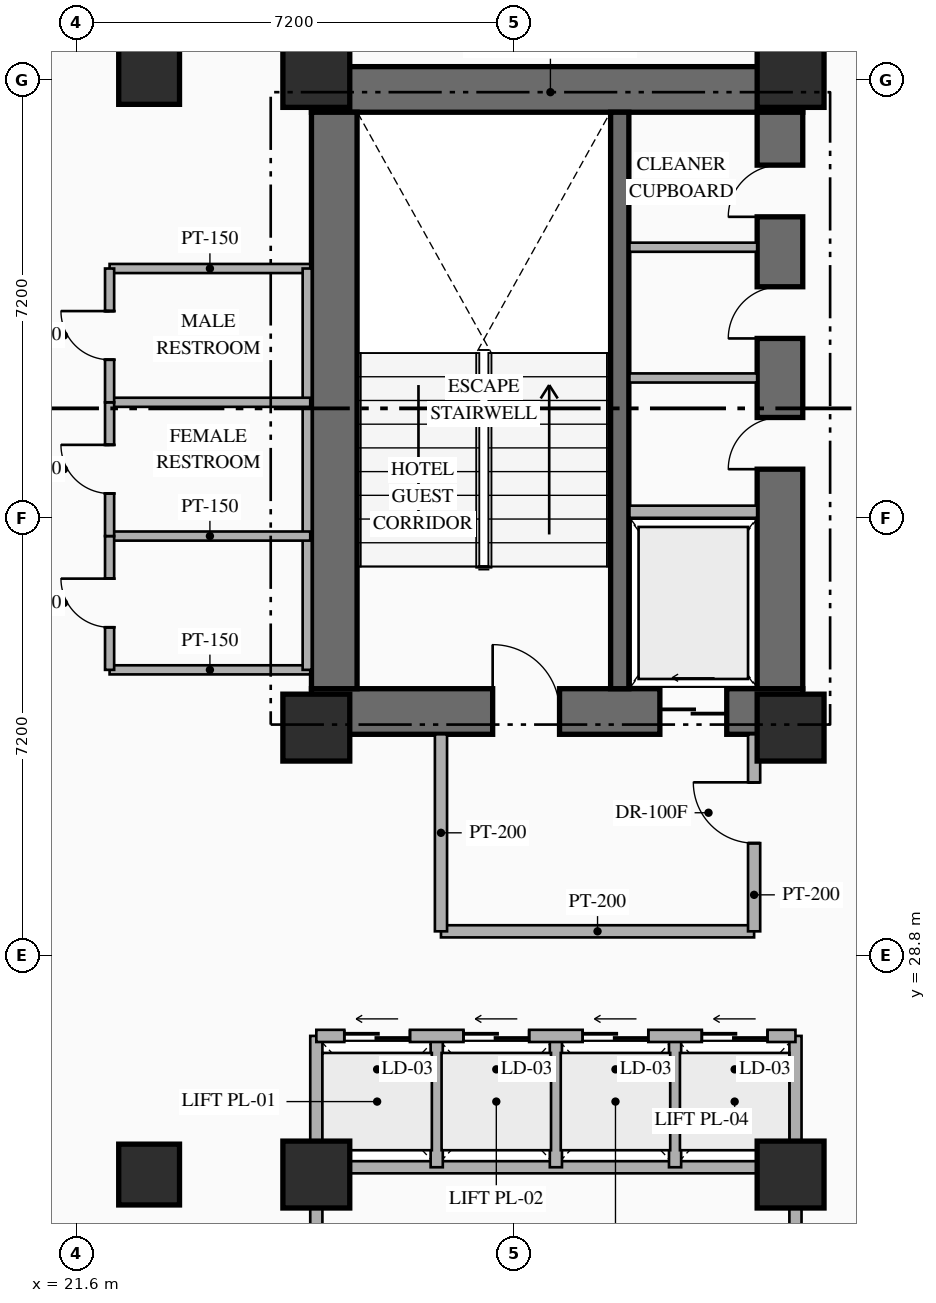
"""IFC4 building model, lengths in metres.
Left out: names, types, materials, properties, quantities, classifications, styles, units other than length and angle.
Written with IfcOpenShell. Run it as: python <this file> out.ifc"""

import sys

from ifc_helpers import new_model, si_unit, direction, frame, frame_2d, origin, origin_2d, place, context, subcontext, project, spatial, rectangle, hollow_rectangle, extrude, element, fill, save


model = new_model("IFC4")
c1 = context("Model", 3, precision=1e-05, world=origin(), true_north=direction((0.0, 1.0)))
c2 = subcontext(c1, "Body", "Model", "MODEL_VIEW")
j1 = project(units=[si_unit("LENGTHUNIT", "METRE"), si_unit("PLANEANGLEUNIT", "RADIAN")], contexts=[c1])
p1 = place(None, origin())
s1 = spatial("IfcSite", under=j1, at=p1, CompositionType="ELEMENT")
p2 = place(p1, origin())
s2 = spatial("IfcBuilding", under=s1, at=p2, CompositionType="ELEMENT")
p3 = place(p2, frame((0.0, 0.0, 50.0)))
s3 = spatial("IfcBuildingStorey", under=s2, at=p3, CompositionType="ELEMENT", Elevation=50.0)
p4 = place(p3, frame((25.47, 32.815, 0.0), z_axis=(0.0, 0.0, 1.0), x_axis=(1.0, 0.0, 0.0)))
e1 = element("IfcWall", 1, at=p4, inside=s3, PredefinedType="SHEAR", context=c2, shape_type="SweptSolid", body=[
    extrude(rectangle(XDim=8.08, YDim=0.75, at=frame_2d((4.04, 0.0))), origin(), (0.0, 0.0, 1.0), 3.35),
])
p5 = place(p4, frame((2.98, 0.0, 0.0)))
e2 = element("IfcOpeningElement", 2, at=p5, cuts=e1, PredefinedType="OPENING", context=c2, shape_type="SweptSolid", body=[
    extrude(rectangle(XDim=1.1, YDim=2.2, at=frame_2d((0.55, 1.1))), frame((0.0, 0.385, 0.0), z_axis=(0.0, -1.0, 0.0), x_axis=(1.0, 0.0, 0.0)), (0.0, 0.0, 1.0), 0.77),
])
p6 = place(p4, frame((5.73, 0.0, 0.0)))
e3 = element("IfcOpeningElement", 3, at=p6, cuts=e1, PredefinedType="OPENING", context=c2, shape_type="SweptSolid", body=[
    extrude(rectangle(XDim=1.1, YDim=2.15, at=frame_2d((0.55, 1.075))), frame((0.0, 0.385, 0.0), z_axis=(0.0, -1.0, 0.0), x_axis=(1.0, 0.0, 0.0)), (0.0, 0.0, 1.0), 0.77),
])
p7 = place(p3, frame((25.47, 43.045, 0.0), z_axis=(0.0, 0.0, 1.0), x_axis=(1.0, 0.0, 0.0)))
e4 = element("IfcWall", 4, at=p7, inside=s3, PredefinedType="SHEAR", context=c2, shape_type="SweptSolid", body=[
    extrude(rectangle(XDim=8.08, YDim=0.75, at=frame_2d((4.04, 0.0))), origin(), (0.0, 0.0, 1.0), 3.35),
])
p8 = place(p3, frame((25.845, 33.19, 0.0), z_axis=(0.0, 0.0, 1.0), x_axis=(0.0, 1.0, 0.0)))
e5 = element("IfcWall", 5, at=p8, inside=s3, PredefinedType="SHEAR", context=c2, shape_type="SweptSolid", body=[
    extrude(rectangle(XDim=9.48, YDim=0.75, at=frame_2d((4.74, 0.0))), origin(), (0.0, 0.0, 1.0), 3.35),
])
p9 = place(p3, frame((33.175, 33.19, 0.0), z_axis=(0.0, 0.0, 1.0), x_axis=(0.0, 1.0, 0.0)))
e6 = element("IfcWall", 6, at=p9, inside=s3, PredefinedType="SHEAR", context=c2, shape_type="SweptSolid", body=[
    extrude(rectangle(XDim=9.48, YDim=0.75, at=frame_2d((4.74, 0.0))), origin(), (0.0, 0.0, 1.0), 3.35),
])
p10 = place(p9, frame((3.61, 0.0, 0.0)))
e7 = element("IfcOpeningElement", 7, at=p10, cuts=e6, PredefinedType="OPENING", context=c2, shape_type="SweptSolid", body=[
    extrude(rectangle(XDim=0.85, YDim=2.08, at=frame_2d((0.425, 1.04))), frame((0.0, 0.385, 0.0), z_axis=(0.0, -1.0, 0.0), x_axis=(1.0, 0.0, 0.0)), (0.0, 0.0, 1.0), 0.77),
])
p11 = place(p9, frame((5.76, 0.0, 0.0)))
e8 = element("IfcOpeningElement", 8, at=p11, cuts=e6, PredefinedType="OPENING", context=c2, shape_type="SweptSolid", body=[
    extrude(rectangle(XDim=0.85, YDim=2.08, at=frame_2d((0.425, 1.04))), frame((0.0, 0.385, 0.0), z_axis=(0.0, -1.0, 0.0), x_axis=(1.0, 0.0, 0.0)), (0.0, 0.0, 1.0), 0.77),
])
p12 = place(p9, frame((7.76, 0.0, 0.0)))
e9 = element("IfcOpeningElement", 9, at=p12, cuts=e6, PredefinedType="OPENING", context=c2, shape_type="SweptSolid", body=[
    extrude(rectangle(XDim=0.85, YDim=2.08, at=frame_2d((0.425, 1.04))), frame((0.0, 0.385, 0.0), z_axis=(0.0, -1.0, 0.0), x_axis=(1.0, 0.0, 0.0)), (0.0, 0.0, 1.0), 0.77),
])
p13 = place(p3, frame((30.54, 33.19, 0.0), z_axis=(0.0, 0.0, 1.0), x_axis=(0.0, 1.0, 0.0)))
e10 = element("IfcWall", 10, at=p13, inside=s3, PredefinedType="SHEAR", context=c2, shape_type="SweptSolid", body=[
    extrude(rectangle(XDim=9.48, YDim=0.3, at=frame_2d((4.74, 0.0))), origin(), (0.0, 0.0, 1.0), 3.35),
])
for number, where, z_axis, x_axis in (
    (11, (25.55, 32.55, 0.0), (0.0, 0.0, 1.0), (1.0, 0.0, 0.0)),
    (12, (33.35, 32.55, 0.0), (0.0, 0.0, 1.0), (1.0, 0.0, 0.0)),
    (13, (25.55, 43.3, 0.0), (0.0, 0.0, 1.0), (1.0, 0.0, 0.0)),
    (14, (33.35, 43.3, 0.0), (0.0, 0.0, 1.0), (1.0, 0.0, 0.0)),
):
    element("IfcColumn", number, at=place(p3, frame(where, z_axis=z_axis, x_axis=x_axis)), inside=s3, PredefinedType="COLUMN", context=c2, shape_type="SweptSolid", body=[
        extrude(rectangle(XDim=1.1, YDim=1.1, at=origin_2d()), origin(), (0.0, 0.0, 1.0), 3.35),
    ])
for number, where, z_axis, x_axis in (
    (15, (25.55, 25.2, 0.0), (0.0, 0.0, 1.0), (1.0, 0.0, 0.0)),
    (16, (33.35, 25.2, 0.0), (0.0, 0.0, 1.0), (1.0, 0.0, 0.0)),
):
    element("IfcColumn", number, at=place(p3, frame(where, z_axis=z_axis, x_axis=x_axis)), inside=s3, PredefinedType="COLUMN", context=c2, shape_type="SweptSolid", body=[
        extrude(hollow_rectangle(XDim=1.1, YDim=1.1, WallThickness=0.04, at=origin_2d()), origin(), (0.0, 0.0, 1.0), 3.35),
    ])
for number, where, z_axis, x_axis in (
    (17, (22.8, 25.2, 0.0), (0.0, 0.0, 1.0), (1.0, 0.0, 0.0)),
    (18, (22.8, 43.3, 0.0), (0.0, 0.0, 1.0), (1.0, 0.0, 0.0)),
):
    element("IfcColumn", number, at=place(p3, frame(where, z_axis=z_axis, x_axis=x_axis)), inside=s3, PredefinedType="COLUMN", context=c2, shape_type="SweptSolid", body=[
        extrude(hollow_rectangle(XDim=1.0, YDim=1.0, WallThickness=0.038, at=origin_2d()), origin(), (0.0, 0.0, 1.0), 3.35),
    ])
p14 = place(p3, frame((30.7, 36.1, 0.0), z_axis=(0.0, 0.0, 1.0), x_axis=(1.0, 0.0, 0.0)))
e19 = element("IfcWall", 19, at=p14, inside=s3, PredefinedType="STANDARD", context=c2, shape_type="SweptSolid", body=[
    extrude(rectangle(XDim=2.1, YDim=0.2, at=frame_2d((1.05, 0.0))), origin(), (0.0, 0.0, 1.0), 3.13),
])
for number, where, z_axis, x_axis in (
    (20, (30.7, 38.3, 0.0), (0.0, 0.0, 1.0), (1.0, 0.0, 0.0)),
    (21, (30.7, 40.45, 0.0), (0.0, 0.0, 1.0), (1.0, 0.0, 0.0)),
):
    element("IfcWall", number, at=place(p3, frame(where, z_axis=z_axis, x_axis=x_axis)), inside=s3, PredefinedType="PARTITIONING", context=c2, shape_type="SweptSolid", body=[
        extrude(rectangle(XDim=2.1, YDim=0.15, at=frame_2d((1.05, 0.0))), origin(), (0.0, 0.0, 1.0), 3.13),
    ])
p15 = place(p3, frame((27.6, 29.2, 0.0), z_axis=(0.0, 0.0, 1.0), x_axis=(1.0, 0.0, 0.0)))
e22 = element("IfcWall", 22, at=p15, inside=s3, PredefinedType="STANDARD", context=c2, shape_type="SweptSolid", body=[
    extrude(rectangle(XDim=5.15, YDim=0.2, at=frame_2d((2.575, 0.0))), origin(), (0.0, 0.0, 1.0), 3.13),
])
p16 = place(p3, frame((27.6, 29.2, 0.0), z_axis=(0.0, 0.0, 1.0), x_axis=(0.0, 1.0, 0.0)))
e23 = element("IfcWall", 23, at=p16, inside=s3, PredefinedType="STANDARD", context=c2, shape_type="SweptSolid", body=[
    extrude(rectangle(XDim=3.24, YDim=0.2, at=frame_2d((1.62, 0.0))), origin(), (0.0, 0.0, 1.0), 3.13),
])
p17 = place(p3, frame((32.75, 29.2, 0.0), z_axis=(0.0, 0.0, 1.0), x_axis=(0.0, 1.0, 0.0)))
e24 = element("IfcWall", 24, at=p17, inside=s3, PredefinedType="STANDARD", context=c2, shape_type="SweptSolid", body=[
    extrude(rectangle(XDim=3.24, YDim=0.2, at=frame_2d((1.62, 0.0))), origin(), (0.0, 0.0, 1.0), 3.13),
])
p18 = place(p17, frame((1.45, 0.0, 0.0)))
e25 = element("IfcOpeningElement", 25, at=p18, cuts=e24, PredefinedType="OPENING", context=c2, shape_type="SweptSolid", body=[
    extrude(rectangle(XDim=1.0, YDim=2.2, at=frame_2d((0.5, 1.1))), frame((0.0, 0.11, 0.0), z_axis=(0.0, -1.0, 0.0), x_axis=(1.0, 0.0, 0.0)), (0.0, 0.0, 1.0), 0.22),
])
for number, where, z_axis, x_axis in (
    (26, (25.55, 23.4, 0.0), (0.0, 0.0, 1.0), (0.0, 1.0, 0.0)),
    (27, (33.43, 23.4, 0.0), (0.0, 0.0, 1.0), (0.0, 1.0, 0.0)),
):
    element("IfcWall", number, at=place(p3, frame(where, z_axis=z_axis, x_axis=x_axis)), inside=s3, PredefinedType="STANDARD", context=c2, shape_type="SweptSolid", body=[
        extrude(rectangle(XDim=4.08, YDim=0.2, at=frame_2d((2.04, 0.0))), origin(), (0.0, 0.0, 1.0), 2.425),
    ])
p19 = place(p3, frame((25.55, 25.32, 0.0), z_axis=(0.0, 0.0, 1.0), x_axis=(1.0, 0.0, 0.0)))
e28 = element("IfcWall", 28, at=p19, inside=s3, PredefinedType="STANDARD", context=c2, shape_type="SweptSolid", body=[
    extrude(rectangle(XDim=7.88, YDim=0.2, at=frame_2d((3.94, 0.0))), origin(), (0.0, 0.0, 1.0), 2.525),
])
for number, where, z_axis, x_axis in (
    (29, (27.53, 25.32, 0.0), (0.0, 0.0, 1.0), (0.0, 1.0, 0.0)),
    (30, (29.49, 25.32, 0.0), (0.0, 0.0, 1.0), (0.0, 1.0, 0.0)),
    (31, (31.45, 25.32, 0.0), (0.0, 0.0, 1.0), (0.0, 1.0, 0.0)),
):
    element("IfcWall", number, at=place(p3, frame(where, z_axis=z_axis, x_axis=x_axis)), inside=s3, PredefinedType="STANDARD", context=c2, shape_type="SweptSolid", body=[
        extrude(rectangle(XDim=2.16, YDim=0.2, at=frame_2d((1.08, 0.0))), origin(), (0.0, 0.0, 1.0), 3.13),
    ])
p20 = place(p3, frame((25.55, 27.48, 0.0), z_axis=(0.0, 0.0, 1.0), x_axis=(1.0, 0.0, 0.0)))
e32 = element("IfcWall", 32, at=p20, inside=s3, PredefinedType="STANDARD", context=c2, shape_type="SweptSolid", body=[
    extrude(rectangle(XDim=7.88, YDim=0.2, at=frame_2d((3.94, 0.0))), origin(), (0.0, 0.0, 1.0), 3.13),
])
p21 = place(p20, frame((0.46, 0.0, 0.0)))
e33 = element("IfcOpeningElement", 33, at=p21, cuts=e32, PredefinedType="OPENING", context=c2, shape_type="SweptSolid", body=[
    extrude(rectangle(XDim=1.08, YDim=2.15, at=frame_2d((0.54, 1.075))), frame((0.0, 0.11, 0.0), z_axis=(0.0, -1.0, 0.0), x_axis=(1.0, 0.0, 0.0)), (0.0, 0.0, 1.0), 0.22),
])
p22 = place(p20, frame((2.42, 0.0, 0.0)))
e34 = element("IfcOpeningElement", 34, at=p22, cuts=e32, PredefinedType="OPENING", context=c2, shape_type="SweptSolid", body=[
    extrude(rectangle(XDim=1.08, YDim=2.15, at=frame_2d((0.54, 1.075))), frame((0.0, 0.11, 0.0), z_axis=(0.0, -1.0, 0.0), x_axis=(1.0, 0.0, 0.0)), (0.0, 0.0, 1.0), 0.22),
])
p23 = place(p20, frame((4.38, 0.0, 0.0)))
e35 = element("IfcOpeningElement", 35, at=p23, cuts=e32, PredefinedType="OPENING", context=c2, shape_type="SweptSolid", body=[
    extrude(rectangle(XDim=1.08, YDim=2.15, at=frame_2d((0.54, 1.075))), frame((0.0, 0.11, 0.0), z_axis=(0.0, -1.0, 0.0), x_axis=(1.0, 0.0, 0.0)), (0.0, 0.0, 1.0), 0.22),
])
p24 = place(p20, frame((6.34, 0.0, 0.0)))
e36 = element("IfcOpeningElement", 36, at=p24, cuts=e32, PredefinedType="OPENING", context=c2, shape_type="SweptSolid", body=[
    extrude(rectangle(XDim=1.08, YDim=2.15, at=frame_2d((0.54, 1.075))), frame((0.0, 0.11, 0.0), z_axis=(0.0, -1.0, 0.0), x_axis=(1.0, 0.0, 0.0)), (0.0, 0.0, 1.0), 0.22),
])
for number, where, z_axis, x_axis in (
    (37, (22.15, 33.5, 0.0), (0.0, 0.0, 1.0), (1.0, 0.0, 0.0)),
    (38, (22.15, 40.1, 0.0), (0.0, 0.0, 1.0), (1.0, 0.0, 0.0)),
):
    element("IfcWall", number, at=place(p3, frame(where, z_axis=z_axis, x_axis=x_axis)), inside=s3, PredefinedType="PARTITIONING", context=c2, shape_type="SweptSolid", body=[
        extrude(rectangle(XDim=3.3, YDim=0.15, at=frame_2d((1.65, 0.0))), origin(), (0.0, 0.0, 1.0), 3.13),
    ])
p25 = place(p3, frame((25.4, 33.5, 0.0), z_axis=(0.0, 0.0, 1.0), x_axis=(0.0, 1.0, 0.0)))
e39 = element("IfcWall", 39, at=p25, inside=s3, PredefinedType="PARTITIONING", context=c2, shape_type="SweptSolid", body=[
    extrude(rectangle(XDim=6.6, YDim=0.15, at=frame_2d((3.3, 0.0))), origin(), (0.0, 0.0, 1.0), 3.13),
])
for number, where, z_axis, x_axis in (
    (40, (22.15, 35.7, 0.0), (0.0, 0.0, 1.0), (1.0, 0.0, 0.0)),
    (41, (22.15, 37.9, 0.0), (0.0, 0.0, 1.0), (1.0, 0.0, 0.0)),
):
    element("IfcWall", number, at=place(p3, frame(where, z_axis=z_axis, x_axis=x_axis)), inside=s3, PredefinedType="PARTITIONING", context=c2, shape_type="SweptSolid", body=[
        extrude(rectangle(XDim=3.3, YDim=0.15, at=frame_2d((1.65, 0.0))), origin(), (0.0, 0.0, 1.0), 3.13),
    ])
p26 = place(p3, frame((22.15, 33.5, 0.0), z_axis=(0.0, 0.0, 1.0), x_axis=(0.0, 1.0, 0.0)))
e42 = element("IfcWall", 42, at=p26, inside=s3, PredefinedType="PARTITIONING", context=c2, shape_type="SweptSolid", body=[
    extrude(rectangle(XDim=2.2, YDim=0.15, at=frame_2d((1.1, 0.0))), origin(), (0.0, 0.0, 1.0), 3.13),
])
p27 = place(p26, frame((0.7, 0.0, 0.0)))
e43 = element("IfcOpeningElement", 43, at=p27, cuts=e42, PredefinedType="OPENING", context=c2, shape_type="SweptSolid", body=[
    extrude(rectangle(XDim=0.8, YDim=2.06, at=frame_2d((0.4, 1.03))), frame((0.0, 0.085, 0.0), z_axis=(0.0, -1.0, 0.0), x_axis=(1.0, 0.0, 0.0)), (0.0, 0.0, 1.0), 0.17),
])
p28 = place(p3, frame((22.15, 35.7, 0.0), z_axis=(0.0, 0.0, 1.0), x_axis=(0.0, 1.0, 0.0)))
e44 = element("IfcWall", 44, at=p28, inside=s3, PredefinedType="PARTITIONING", context=c2, shape_type="SweptSolid", body=[
    extrude(rectangle(XDim=2.2, YDim=0.15, at=frame_2d((1.1, 0.0))), origin(), (0.0, 0.0, 1.0), 3.13),
])
p29 = place(p28, frame((0.7, 0.0, 0.0)))
e45 = element("IfcOpeningElement", 45, at=p29, cuts=e44, PredefinedType="OPENING", context=c2, shape_type="SweptSolid", body=[
    extrude(rectangle(XDim=0.8, YDim=2.06, at=frame_2d((0.4, 1.03))), frame((0.0, 0.085, 0.0), z_axis=(0.0, -1.0, 0.0), x_axis=(1.0, 0.0, 0.0)), (0.0, 0.0, 1.0), 0.17),
])
p30 = place(p3, frame((22.15, 37.9, 0.0), z_axis=(0.0, 0.0, 1.0), x_axis=(0.0, 1.0, 0.0)))
e46 = element("IfcWall", 46, at=p30, inside=s3, PredefinedType="PARTITIONING", context=c2, shape_type="SweptSolid", body=[
    extrude(rectangle(XDim=2.2, YDim=0.15, at=frame_2d((1.1, 0.0))), origin(), (0.0, 0.0, 1.0), 3.13),
])
p31 = place(p30, frame((0.7, 0.0, 0.0)))
e47 = element("IfcOpeningElement", 47, at=p31, cuts=e46, PredefinedType="OPENING", context=c2, shape_type="SweptSolid", body=[
    extrude(rectangle(XDim=0.8, YDim=2.06, at=frame_2d((0.4, 1.03))), frame((0.0, 0.085, 0.0), z_axis=(0.0, -1.0, 0.0), x_axis=(1.0, 0.0, 0.0)), (0.0, 0.0, 1.0), 0.17),
])
p32 = place(p3, frame((33.384, 17.312, 0.0), z_axis=(0.0, 0.0, 1.0), x_axis=(0.600008743659, 0.799993442181, 0.0)))
e48 = element("IfcWall", 48, at=p32, inside=s3, PredefinedType="PARTITIONING", context=c2, shape_type="SweptSolid", body=[
    extrude(rectangle(XDim=8.935, YDim=0.15, at=frame_2d((4.468, 0.0))), origin(), (0.0, 0.0, 1.0), 3.13),
])
p33 = place(p5, origin())
e49 = element("IfcDoor", 49, at=p33, inside=s3, OperationType="SINGLE_SWING_LEFT", PredefinedType="DOOR", context=c2, shape_type="SweptSolid", body=[
    extrude(rectangle(XDim=1.1, YDim=2.2, at=frame_2d((0.55, 1.1))), frame((0.0, 0.025, 0.0), z_axis=(0.0, -1.0, 0.0), x_axis=(1.0, 0.0, 0.0)), (0.0, 0.0, 1.0), 0.05),
])
fill(e2, e49)
p34 = place(p6, origin())
e50 = element("IfcDoor", 50, at=p34, inside=s3, OperationType="SLIDING_TO_LEFT", PredefinedType="USERDEFINED", context=c2, shape_type="SweptSolid", body=[
    extrude(rectangle(XDim=1.1, YDim=2.15, at=frame_2d((0.55, 1.075))), frame((0.0, 0.025, 0.0), z_axis=(0.0, -1.0, 0.0), x_axis=(1.0, 0.0, 0.0)), (0.0, 0.0, 1.0), 0.05),
])
fill(e3, e50)
p35 = place(p10, origin())
e51 = element("IfcDoor", 51, at=p35, inside=s3, OperationType="SINGLE_SWING_LEFT", PredefinedType="DOOR", context=c2, shape_type="SweptSolid", body=[
    extrude(rectangle(XDim=0.85, YDim=2.08, at=frame_2d((0.425, 1.04))), frame((0.0, 0.025, 0.0), z_axis=(0.0, -1.0, 0.0), x_axis=(1.0, 0.0, 0.0)), (0.0, 0.0, 1.0), 0.05),
])
fill(e7, e51)
p36 = place(p11, origin())
e52 = element("IfcDoor", 52, at=p36, inside=s3, OperationType="SINGLE_SWING_LEFT", PredefinedType="DOOR", context=c2, shape_type="SweptSolid", body=[
    extrude(rectangle(XDim=0.85, YDim=2.08, at=frame_2d((0.425, 1.04))), frame((0.0, 0.025, 0.0), z_axis=(0.0, -1.0, 0.0), x_axis=(1.0, 0.0, 0.0)), (0.0, 0.0, 1.0), 0.05),
])
fill(e8, e52)
p37 = place(p12, origin())
e53 = element("IfcDoor", 53, at=p37, inside=s3, OperationType="SINGLE_SWING_LEFT", PredefinedType="DOOR", context=c2, shape_type="SweptSolid", body=[
    extrude(rectangle(XDim=0.85, YDim=2.08, at=frame_2d((0.425, 1.04))), frame((0.0, 0.025, 0.0), z_axis=(0.0, -1.0, 0.0), x_axis=(1.0, 0.0, 0.0)), (0.0, 0.0, 1.0), 0.05),
])
fill(e9, e53)
p38 = place(p18, origin())
e54 = element("IfcDoor", 54, at=p38, inside=s3, OperationType="SINGLE_SWING_RIGHT", PredefinedType="DOOR", context=c2, shape_type="SweptSolid", body=[
    extrude(rectangle(XDim=1.0, YDim=2.2, at=frame_2d((0.5, 1.1))), frame((0.0, 0.025, 0.0), z_axis=(0.0, -1.0, 0.0), x_axis=(1.0, 0.0, 0.0)), (0.0, 0.0, 1.0), 0.05),
])
fill(e25, e54)
p39 = place(p21, origin())
e55 = element("IfcDoor", 55, at=p39, inside=s3, OperationType="SLIDING_TO_LEFT", PredefinedType="USERDEFINED", context=c2, shape_type="SweptSolid", body=[
    extrude(rectangle(XDim=1.08, YDim=2.15, at=frame_2d((0.54, 1.075))), frame((0.0, 0.025, 0.0), z_axis=(0.0, -1.0, 0.0), x_axis=(1.0, 0.0, 0.0)), (0.0, 0.0, 1.0), 0.05),
])
fill(e33, e55)
p40 = place(p22, origin())
e56 = element("IfcDoor", 56, at=p40, inside=s3, OperationType="SLIDING_TO_LEFT", PredefinedType="USERDEFINED", context=c2, shape_type="SweptSolid", body=[
    extrude(rectangle(XDim=1.08, YDim=2.15, at=frame_2d((0.54, 1.075))), frame((0.0, 0.025, 0.0), z_axis=(0.0, -1.0, 0.0), x_axis=(1.0, 0.0, 0.0)), (0.0, 0.0, 1.0), 0.05),
])
fill(e34, e56)
p41 = place(p23, origin())
e57 = element("IfcDoor", 57, at=p41, inside=s3, OperationType="SLIDING_TO_LEFT", PredefinedType="USERDEFINED", context=c2, shape_type="SweptSolid", body=[
    extrude(rectangle(XDim=1.08, YDim=2.15, at=frame_2d((0.54, 1.075))), frame((0.0, 0.025, 0.0), z_axis=(0.0, -1.0, 0.0), x_axis=(1.0, 0.0, 0.0)), (0.0, 0.0, 1.0), 0.05),
])
fill(e35, e57)
p42 = place(p24, origin())
e58 = element("IfcDoor", 58, at=p42, inside=s3, OperationType="SLIDING_TO_LEFT", PredefinedType="USERDEFINED", context=c2, shape_type="SweptSolid", body=[
    extrude(rectangle(XDim=1.08, YDim=2.15, at=frame_2d((0.54, 1.075))), frame((0.0, 0.025, 0.0), z_axis=(0.0, -1.0, 0.0), x_axis=(1.0, 0.0, 0.0)), (0.0, 0.0, 1.0), 0.05),
])
fill(e36, e58)
p43 = place(p27, origin())
e59 = element("IfcDoor", 59, at=p43, inside=s3, OperationType="SINGLE_SWING_RIGHT", PredefinedType="DOOR", context=c2, shape_type="SweptSolid", body=[
    extrude(rectangle(XDim=0.8, YDim=2.06, at=frame_2d((0.4, 1.03))), frame((0.0, 0.025, 0.0), z_axis=(0.0, -1.0, 0.0), x_axis=(1.0, 0.0, 0.0)), (0.0, 0.0, 1.0), 0.05),
])
fill(e43, e59)
p44 = place(p29, origin())
e60 = element("IfcDoor", 60, at=p44, inside=s3, OperationType="SINGLE_SWING_RIGHT", PredefinedType="DOOR", context=c2, shape_type="SweptSolid", body=[
    extrude(rectangle(XDim=0.8, YDim=2.06, at=frame_2d((0.4, 1.03))), frame((0.0, 0.025, 0.0), z_axis=(0.0, -1.0, 0.0), x_axis=(1.0, 0.0, 0.0)), (0.0, 0.0, 1.0), 0.05),
])
fill(e45, e60)
p45 = place(p31, origin())
e61 = element("IfcDoor", 61, at=p45, inside=s3, OperationType="SINGLE_SWING_RIGHT", PredefinedType="DOOR", context=c2, shape_type="SweptSolid", body=[
    extrude(rectangle(XDim=0.8, YDim=2.06, at=frame_2d((0.4, 1.03))), frame((0.0, 0.025, 0.0), z_axis=(0.0, -1.0, 0.0), x_axis=(1.0, 0.0, 0.0)), (0.0, 0.0, 1.0), 0.05),
])
fill(e47, e61)
save(model, sys.argv[1])
